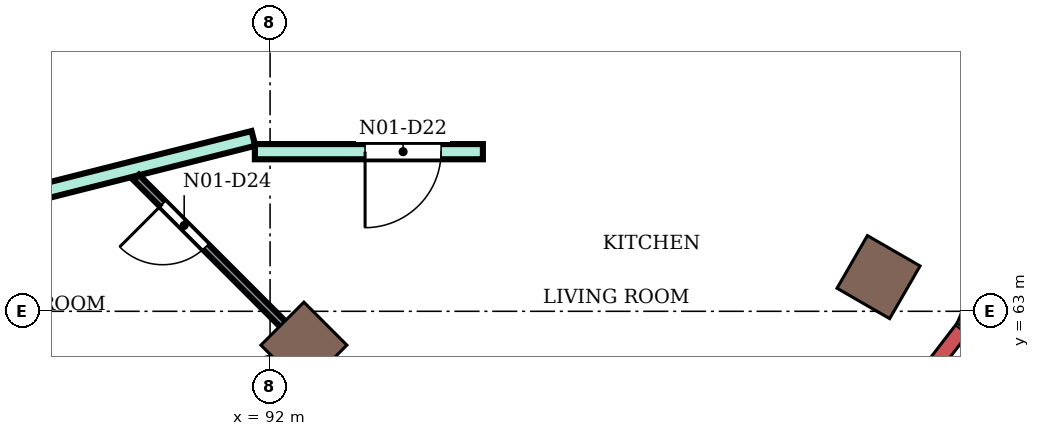
"""IFC4 building model, lengths in metres.
Left out: names, types, materials, properties, quantities, classifications, styles, units other than length and angle.
Written with IfcOpenShell. Run it as: python <this file> out.ifc"""

import sys

from ifc_helpers import new_model, si_unit, direction, frame, frame_2d, origin, origin_2d, place, context, subcontext, project, spatial, rectangle, extrude, element, fill, save


model = new_model("IFC4")
c1 = context("Model", 3, precision=1e-05, world=origin(), true_north=direction((0.0, 1.0)))
c2 = subcontext(c1, "Body", "Model", "MODEL_VIEW")
j1 = project(units=[si_unit("LENGTHUNIT", "METRE"), si_unit("PLANEANGLEUNIT", "RADIAN")], contexts=[c1])
p1 = place(None, origin())
s1 = spatial("IfcSite", under=j1, at=p1, CompositionType="ELEMENT")
p2 = place(p1, origin())
s2 = spatial("IfcBuilding", under=s1, at=p2, CompositionType="ELEMENT")
p3 = place(p2, frame((0.0, 0.0, 284.1)))
s3 = spatial("IfcBuildingStorey", under=s2, at=p3, CompositionType="ELEMENT", Elevation=284.1)
for number, where, z_axis, x_axis in (
    (1, (100.005, 63.45, 0.0), (0.0, 0.0, 1.0), (0.866, -0.5, 0.0)),
    (2, (92.445, 62.555, 0.0), (0.0, 0.0, 1.0), (0.707, -0.707, 0.0)),
):
    element("IfcColumn", number, at=place(p3, frame(where, z_axis=z_axis, x_axis=x_axis)), inside=s3, PredefinedType="COLUMN", context=c2, shape_type="SweptSolid", body=[
        extrude(rectangle(XDim=0.8, YDim=0.8, at=origin_2d()), origin(), (0.0, 0.0, 1.0), 4.2),
    ])
p4 = place(p3, frame((86.053, 63.826, 0.0), z_axis=(0.0, 0.0, 1.0), x_axis=(0.969490004987, 0.245130843083, 0.0)))
e3 = element("IfcWall", 3, at=p4, inside=s3, PredefinedType="PARTITIONING", context=c2, shape_type="SweptSolid", body=[
    extrude(rectangle(XDim=5.908, YDim=0.2, at=frame_2d((2.954, 0.0))), origin(), (0.0, 0.0, 1.0), 3.75),
])
p5 = place(p3, frame((91.8, 65.1, 0.0), z_axis=(0.0, 0.0, 1.0), x_axis=(1.0, 0.0, 0.0)))
e4 = element("IfcWall", 4, at=p5, inside=s3, PredefinedType="PARTITIONING", context=c2, shape_type="SweptSolid", body=[
    extrude(rectangle(XDim=3.0, YDim=0.2, at=frame_2d((1.5, 0.0))), origin(), (0.0, 0.0, 1.0), 3.75),
])
p6 = place(p5, frame((1.45, 0.0, 0.0)))
e5 = element("IfcOpeningElement", 5, at=p6, cuts=e4, PredefinedType="OPENING", context=c2, shape_type="SweptSolid", body=[
    extrude(rectangle(XDim=1.0, YDim=2.1, at=frame_2d((0.5, 1.05))), frame((0.0, 0.11, 0.0), z_axis=(0.0, -1.0, 0.0), x_axis=(1.0, 0.0, 0.0)), (0.0, 0.0, 1.0), 0.22),
])
p7 = place(p3, frame((86.461, 63.81, 0.0), z_axis=(0.0, 0.0, 1.0), x_axis=(0.499933609462, -0.866063730986, 0.0)))
e6 = element("IfcWall", 6, at=p7, inside=s3, PredefinedType="PARTITIONING", context=c2, shape_type="SweptSolid", body=[
    extrude(rectangle(XDim=11.376, YDim=0.1, at=frame_2d((5.688, 0.0))), origin(), (0.0, 0.0, 1.0), 3.75),
])
p8 = place(p7, frame((7.47, 0.0, 0.0)))
e7 = element("IfcOpeningElement", 7, at=p8, cuts=e6, PredefinedType="OPENING", context=c2, shape_type="SweptSolid", body=[
    extrude(rectangle(XDim=0.9, YDim=2.1, at=frame_2d((0.45, 1.05))), frame((0.0, 0.06, 0.0), z_axis=(0.0, -1.0, 0.0), x_axis=(1.0, 0.0, 0.0)), (0.0, 0.0, 1.0), 0.12),
])
p9 = place(p3, frame((87.966, 61.319, 0.0), z_axis=(0.0, 0.0, 1.0), x_axis=(0.969427184869, 0.245379162189, 0.0)))
e8 = element("IfcWall", 8, at=p9, inside=s3, PredefinedType="PARTITIONING", context=c2, shape_type="SweptSolid", body=[
    extrude(rectangle(XDim=4.625, YDim=0.1, at=frame_2d((2.312, 0.0))), origin(), (0.0, 0.0, 1.0), 3.75),
])
p10 = place(p3, frame((90.239, 64.761, 0.0), z_axis=(0.0, 0.0, 1.0), x_axis=(0.707106781187, -0.707106781187, 0.0)))
e9 = element("IfcWall", 9, at=p10, inside=s3, PredefinedType="PARTITIONING", context=c2, shape_type="SweptSolid", body=[
    extrude(rectangle(XDim=7.22, YDim=0.1, at=frame_2d((3.61, 0.0))), origin(), (0.0, 0.0, 1.0), 3.75),
])
p11 = place(p10, frame((4.592, 0.0, 0.0)))
e10 = element("IfcOpeningElement", 10, at=p11, cuts=e9, PredefinedType="OPENING", context=c2, shape_type="SweptSolid", body=[
    extrude(rectangle(XDim=0.9, YDim=2.1, at=frame_2d((0.45, 1.05))), frame((0.0, 0.06, 0.0), z_axis=(0.0, -1.0, 0.0), x_axis=(1.0, 0.0, 0.0)), (0.0, 0.0, 1.0), 0.12),
])
p12 = place(p10, frame((0.492, 0.0, 0.0)))
e11 = element("IfcOpeningElement", 11, at=p12, cuts=e9, PredefinedType="OPENING", context=c2, shape_type="SweptSolid", body=[
    extrude(rectangle(XDim=0.8, YDim=2.1, at=frame_2d((0.4, 1.05))), frame((0.0, 0.06, 0.0), z_axis=(0.0, -1.0, 0.0), x_axis=(1.0, 0.0, 0.0)), (0.0, 0.0, 1.0), 0.12),
])
p13 = place(p6, frame((1.0, 0.0, 0.0), z_axis=(0.0, 0.0, 1.0), x_axis=(-1.0, 0.0, 0.0)))
e12 = element("IfcDoor", 12, at=p13, inside=s3, OperationType="SINGLE_SWING_RIGHT", PredefinedType="DOOR", context=c2, shape_type="SweptSolid", body=[
    extrude(rectangle(XDim=1.0, YDim=2.1, at=frame_2d((0.5, 1.05))), frame((0.0, 0.025, 0.0), z_axis=(0.0, -1.0, 0.0), x_axis=(1.0, 0.0, 0.0)), (0.0, 0.0, 1.0), 0.05),
])
fill(e5, e12)
p14 = place(p12, frame((0.8, 0.0, 0.0), z_axis=(0.0, 0.0, 1.0), x_axis=(-1.0, 0.0, 0.0)))
e13 = element("IfcDoor", 13, at=p14, inside=s3, OperationType="SINGLE_SWING_RIGHT", PredefinedType="DOOR", context=c2, shape_type="SweptSolid", body=[
    extrude(rectangle(XDim=0.8, YDim=2.1, at=frame_2d((0.4, 1.05))), frame((0.0, 0.025, 0.0), z_axis=(0.0, -1.0, 0.0), x_axis=(1.0, 0.0, 0.0)), (0.0, 0.0, 1.0), 0.05),
])
fill(e11, e13)
save(model, sys.argv[1])
